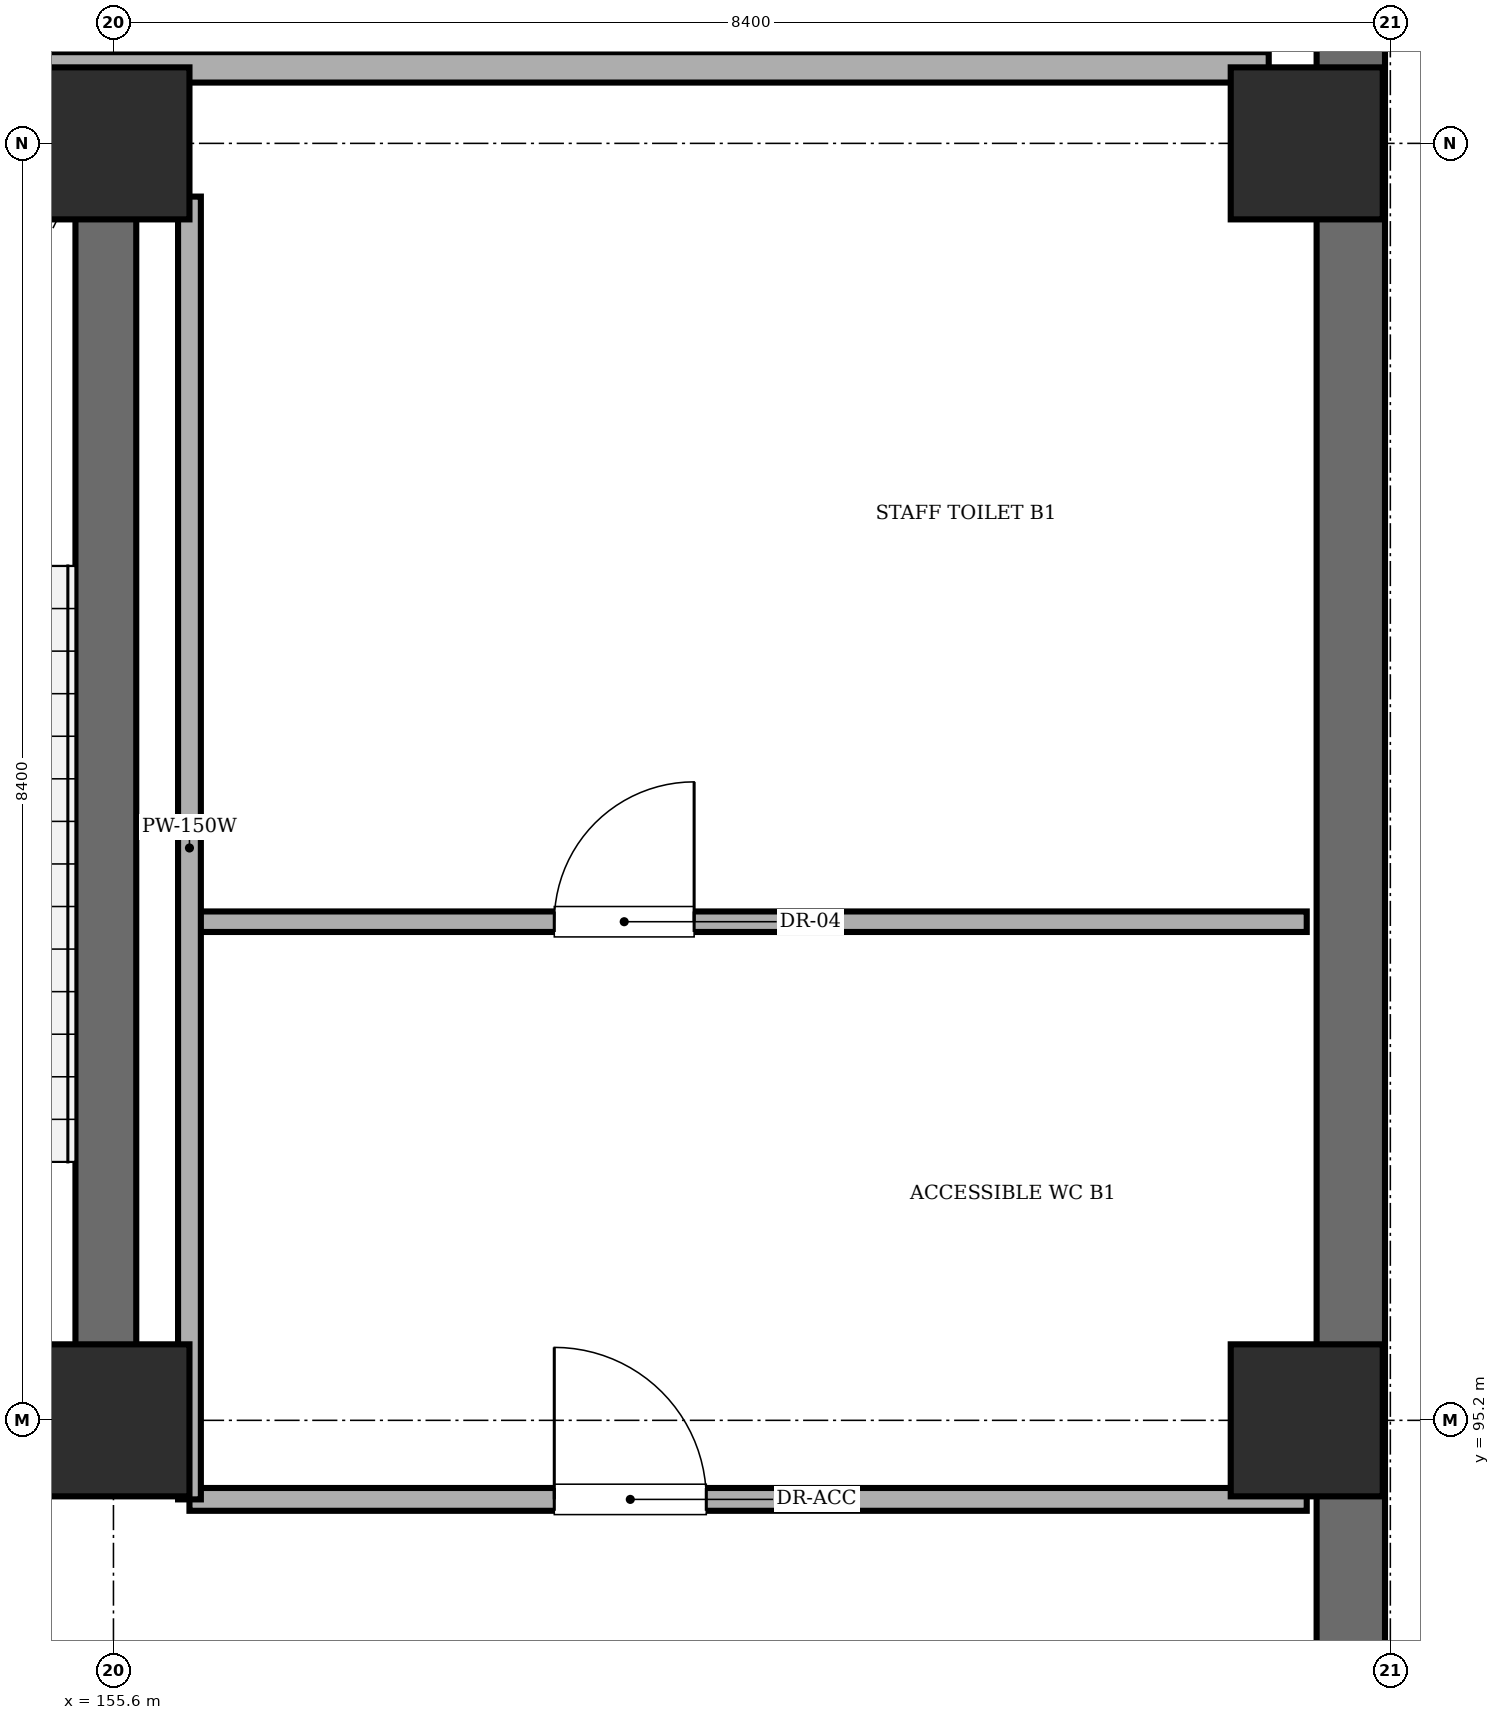
"""IFC4 building model, lengths in metres.
Left out: names, types, materials, properties, quantities, classifications, styles, units other than length and angle.
Written with IfcOpenShell. Run it as: python <this file> out.ifc"""

import sys

from ifc_helpers import new_model, si_unit, direction, frame, frame_2d, origin, origin_2d, place, context, subcontext, project, spatial, rectangle, extrude, element, fill, save


model = new_model("IFC4")
c1 = context("Model", 3, precision=1e-05, world=origin(), true_north=direction((0.0, 1.0)))
c2 = subcontext(c1, "Body", "Model", "MODEL_VIEW")
j1 = project(units=[si_unit("LENGTHUNIT", "METRE"), si_unit("PLANEANGLEUNIT", "RADIAN")], contexts=[c1])
p1 = place(None, origin())
s1 = spatial("IfcSite", under=j1, at=p1, CompositionType="ELEMENT")
p2 = place(p1, origin())
s2 = spatial("IfcBuilding", under=s1, at=p2, CompositionType="ELEMENT")
p3 = place(p2, frame((0.0, 0.0, -4.8)))
s3 = spatial("IfcBuildingStorey", under=s2, at=p3, CompositionType="ELEMENT", Elevation=-4.8)
for number, where, z_axis, x_axis in (
    (1, (155.6, 95.2, 0.0), (0.0, 0.0, 1.0), (1.0, 0.0, 0.0)),
    (2, (155.6, 103.6, 0.0), (0.0, 0.0, 1.0), (1.0, 0.0, 0.0)),
    (3, (163.45, 95.2, 0.0), (0.0, 0.0, 1.0), (1.0, 0.0, 0.0)),
    (4, (163.45, 103.6, 0.0), (0.0, 0.0, 1.0), (1.0, 0.0, 0.0)),
):
    element("IfcColumn", number, at=place(p3, frame(where, z_axis=z_axis, x_axis=x_axis)), inside=s3, PredefinedType="COLUMN", context=c2, shape_type="SweptSolid", body=[
        extrude(rectangle(XDim=1.0, YDim=1.0, at=origin_2d()), origin(), (0.0, 0.0, 1.0), 4.395),
    ])
p4 = place(p3, frame((163.74, 0.26, 0.0), z_axis=(0.0, 0.0, 1.0), x_axis=(0.0, 1.0, 0.0)))
e5 = element("IfcWall", 5, at=p4, inside=s3, PredefinedType="SHEAR", context=c2, shape_type="SweptSolid", body=[
    extrude(rectangle(XDim=111.48, YDim=0.45, at=frame_2d((55.74, 0.0))), origin(), (0.0, 0.0, 1.0), 3.75),
])
for number, where, z_axis, x_axis in (
    (6, (151.85, 95.25, 0.0), (0.0, 0.0, 1.0), (1.0, 0.0, 0.0)),
    (7, (151.85, 103.55, 0.0), (0.0, 0.0, 1.0), (1.0, 0.0, 0.0)),
):
    element("IfcWall", number, at=place(p3, frame(where, z_axis=z_axis, x_axis=x_axis)), inside=s3, PredefinedType="SHEAR", context=c2, shape_type="SweptSolid", body=[
        extrude(rectangle(XDim=3.9, YDim=0.4, at=frame_2d((1.95, 0.0))), origin(), (0.0, 0.0, 1.0), 4.395),
    ])
p5 = place(p3, frame((155.55, 95.45, 0.0), z_axis=(0.0, 0.0, 1.0), x_axis=(0.0, 1.0, 0.0)))
e8 = element("IfcWall", 8, at=p5, inside=s3, PredefinedType="SHEAR", context=c2, shape_type="SweptSolid", body=[
    extrude(rectangle(XDim=7.9, YDim=0.4, at=frame_2d((3.95, 0.0))), origin(), (0.0, 0.0, 1.0), 4.395),
])
p6 = place(p3, frame((156.1, 94.68, 0.0), z_axis=(0.0, 0.0, 1.0), x_axis=(1.0, 0.0, 0.0)))
e9 = element("IfcWall", 9, at=p6, inside=s3, PredefinedType="PARTITIONING", context=c2, shape_type="SweptSolid", body=[
    extrude(rectangle(XDim=7.35, YDim=0.15, at=frame_2d((3.675, 0.0))), origin(), (0.0, 0.0, 1.0), 4.395),
])
p7 = place(p6, frame((2.4, 0.0, 0.0)))
e10 = element("IfcOpeningElement", 10, at=p7, cuts=e9, PredefinedType="OPENING", context=c2, shape_type="SweptSolid", body=[
    extrude(rectangle(XDim=1.0, YDim=2.12, at=frame_2d((0.5, 1.06))), frame((0.0, 0.085, 0.0), z_axis=(0.0, -1.0, 0.0), x_axis=(1.0, 0.0, 0.0)), (0.0, 0.0, 1.0), 0.17),
])
p8 = place(p3, frame((156.1, 98.48, 0.0), z_axis=(0.0, 0.0, 1.0), x_axis=(1.0, 0.0, 0.0)))
e11 = element("IfcWall", 11, at=p8, inside=s3, PredefinedType="PARTITIONING", context=c2, shape_type="SweptSolid", body=[
    extrude(rectangle(XDim=7.35, YDim=0.135, at=frame_2d((3.675, 0.0))), origin(), (0.0, 0.0, 1.0), 4.395),
])
p9 = place(p8, frame((2.4, 0.0, 0.0)))
e12 = element("IfcOpeningElement", 12, at=p9, cuts=e11, PredefinedType="OPENING", context=c2, shape_type="SweptSolid", body=[
    extrude(rectangle(XDim=0.92, YDim=2.1, at=frame_2d((0.46, 1.05))), frame((0.0, 0.077, 0.0), z_axis=(0.0, -1.0, 0.0), x_axis=(1.0, 0.0, 0.0)), (0.0, 0.0, 1.0), 0.155),
])
p10 = place(p3, frame((156.1, 94.68, 0.0), z_axis=(0.0, 0.0, 1.0), x_axis=(0.0, 1.0, 0.0)))
e13 = element("IfcWall", 13, at=p10, inside=s3, PredefinedType="PARTITIONING", context=c2, shape_type="SweptSolid", body=[
    extrude(rectangle(XDim=8.57, YDim=0.15, at=frame_2d((4.285, 0.0))), origin(), (0.0, 0.0, 1.0), 4.395),
])
p11 = place(p3, frame((122.4, 104.1, 0.0), z_axis=(0.0, 0.0, 1.0), x_axis=(1.0, 0.0, 0.0)))
e14 = element("IfcWall", 14, at=p11, inside=s3, PredefinedType="SOLIDWALL", context=c2, shape_type="SweptSolid", body=[
    extrude(rectangle(XDim=40.8, YDim=0.2, at=frame_2d((20.4, 0.0))), origin(), (0.0, 0.0, 1.0), 4.395),
])
p12 = place(p11, frame((11.2, 0.0, 0.0)))
e15 = element("IfcOpeningElement", 15, at=p12, cuts=e14, PredefinedType="OPENING", context=c2, shape_type="SweptSolid", body=[
    extrude(rectangle(XDim=1.25, YDim=2.2, at=frame_2d((0.625, 1.1))), frame((0.0, 0.11, 0.0), z_axis=(0.0, -1.0, 0.0), x_axis=(1.0, 0.0, 0.0)), (0.0, 0.0, 1.0), 0.22),
])
p13 = place(p7, origin())
e16 = element("IfcDoor", 16, at=p13, inside=s3, OperationType="SINGLE_SWING_LEFT", PredefinedType="DOOR", context=c2, shape_type="SweptSolid", body=[
    extrude(rectangle(XDim=1.0, YDim=2.12, at=frame_2d((0.5, 1.06))), frame((0.0, 0.025, 0.0), z_axis=(0.0, -1.0, 0.0), x_axis=(1.0, 0.0, 0.0)), (0.0, 0.0, 1.0), 0.05),
])
fill(e10, e16)
p14 = place(p9, origin())
e17 = element("IfcDoor", 17, at=p14, inside=s3, OperationType="SINGLE_SWING_RIGHT", PredefinedType="DOOR", context=c2, shape_type="SweptSolid", body=[
    extrude(rectangle(XDim=0.92, YDim=2.1, at=frame_2d((0.46, 1.05))), frame((0.0, 0.025, 0.0), z_axis=(0.0, -1.0, 0.0), x_axis=(1.0, 0.0, 0.0)), (0.0, 0.0, 1.0), 0.05),
])
fill(e12, e17)
save(model, sys.argv[1])
